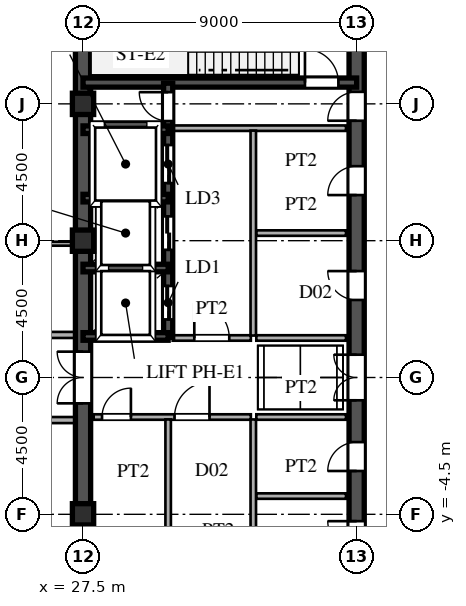
"""IFC4 building model, lengths in metres.
Left out: names, types, materials, properties, quantities, classifications, styles, units other than length and angle.
Written with IfcOpenShell. Run it as: python <this file> out.ifc"""

import sys

from ifc_helpers import new_model, si_unit, direction, frame, frame_2d, origin, origin_2d, place, context, subcontext, project, spatial, rectangle, hollow_rectangle, extrude, source, transform, mapped, element, fill, save


model = new_model("IFC4")
c1 = context("Model", 3, precision=1e-05, world=origin(), true_north=direction((0.0, 1.0)))
c2 = subcontext(c1, "Body", "Model", "MODEL_VIEW")
j1 = project(units=[si_unit("LENGTHUNIT", "METRE"), si_unit("PLANEANGLEUNIT", "RADIAN")], contexts=[c1])
p1 = place(None, origin())
s1 = spatial("IfcSite", under=j1, at=p1, CompositionType="ELEMENT")
p2 = place(p1, origin())
s2 = spatial("IfcBuilding", under=s1, at=p2, CompositionType="ELEMENT")
p3 = place(p2, frame((0.0, 0.0, 269.4)))
s3 = spatial("IfcBuildingStorey", under=s2, at=p3, CompositionType="ELEMENT", Elevation=269.4)
m1 = source(origin(), c2, "Body", "SweptSolid", [
    extrude(hollow_rectangle(XDim=0.7, YDim=0.7, WallThickness=0.03, at=origin_2d()), origin(), (0.0, 0.0, 1.0), 4.8),
])
for number, where, z_axis, x_axis in (
    (1, (27.5, -4.5, 0.0), (0.0, 0.0, 1.0), (1.0, 0.0, 0.0)),
    (2, (27.5, 4.5, 0.0), (0.0, 0.0, 1.0), (1.0, 0.0, 0.0)),
    (3, (27.5, 9.0, 0.0), (0.0, 0.0, 1.0), (1.0, 0.0, 0.0)),
):
    element("IfcColumn", number, at=place(p3, frame(where, z_axis=z_axis, x_axis=x_axis)), inside=s3, PredefinedType="COLUMN", context=c2, shape_type="MappedRepresentation", body=[
        mapped(m1, transform((0.0, 0.0, 0.0), scale=1.0)),
    ])
for number, where, z_axis, x_axis in (
    (4, (27.5, -13.5, 0.0), (0.0, 0.0, 1.0), (0.0, 1.0, 0.0)),
    (5, (27.5, 1.3, 0.0), (0.0, 0.0, 1.0), (0.0, 1.0, 0.0)),
):
    element("IfcWall", number, at=place(p3, frame(where, z_axis=z_axis, x_axis=x_axis)), inside=s3, PredefinedType="SHEAR", context=c2, shape_type="SweptSolid", body=[
        extrude(rectangle(XDim=12.2, YDim=0.5, at=frame_2d((6.1, 0.0))), origin(), (0.0, 0.0, 1.0), 4.54),
    ])
p4 = place(p3, frame((27.5, -1.3, 0.0), z_axis=(0.0, 0.0, 1.0), x_axis=(0.0, 1.0, 0.0)))
e6 = element("IfcWall", 6, at=p4, inside=s3, PredefinedType="SHEAR", context=c2, shape_type="SweptSolid", body=[
    extrude(rectangle(XDim=2.6, YDim=0.5, at=frame_2d((1.3, 0.0))), origin(), (0.0, 0.0, 1.0), 4.54),
])
p5 = place(p4, frame((0.45, 0.0, 0.0)))
e7 = element("IfcOpeningElement", 7, at=p5, cuts=e6, PredefinedType="OPENING", context=c2, shape_type="SweptSolid", body=[
    extrude(rectangle(XDim=1.7, YDim=2.35, at=frame_2d((0.85, 1.175))), frame((0.0, 0.26, 0.0), z_axis=(0.0, -1.0, 0.0), x_axis=(1.0, 0.0, 0.0)), (0.0, 0.0, 1.0), 0.52),
])
p6 = place(p3, frame((36.5, -1.3, 0.0), z_axis=(0.0, 0.0, 1.0), x_axis=(0.0, 1.0, 0.0)))
e8 = element("IfcWall", 8, at=p6, inside=s3, PredefinedType="SHEAR", context=c2, shape_type="SweptSolid", body=[
    extrude(rectangle(XDim=2.6, YDim=0.5, at=frame_2d((1.3, 0.0))), origin(), (0.0, 0.0, 1.0), 4.54),
])
p7 = place(p6, frame((0.55, 0.0, 0.0)))
e9 = element("IfcOpeningElement", 9, at=p7, cuts=e8, PredefinedType="OPENING", context=c2, shape_type="SweptSolid", body=[
    extrude(rectangle(XDim=1.5, YDim=2.3, at=frame_2d((0.75, 1.15))), frame((0.0, 0.26, 0.0), z_axis=(0.0, -1.0, 0.0), x_axis=(1.0, 0.0, 0.0)), (0.0, 0.0, 1.0), 0.52),
])
p8 = place(p3, frame((36.5, 8.2, 0.0), z_axis=(0.0, 0.0, 1.0), x_axis=(0.0, 1.0, 0.0)))
e10 = element("IfcWall", 10, at=p8, inside=s3, PredefinedType="SHEAR", context=c2, shape_type="SweptSolid", body=[
    extrude(rectangle(XDim=5.45, YDim=0.5, at=frame_2d((2.725, 0.0))), origin(), (0.0, 0.0, 1.0), 4.54),
])
p9 = place(p8, frame((0.245, 0.0, 0.0)))
e11 = element("IfcOpeningElement", 11, at=p9, cuts=e10, PredefinedType="OPENING", context=c2, shape_type="SweptSolid", body=[
    extrude(rectangle(XDim=0.95, YDim=2.15, at=frame_2d((0.475, 1.075))), frame((0.0, 0.26, 0.0), z_axis=(0.0, -1.0, 0.0), x_axis=(1.0, 0.0, 0.0)), (0.0, 0.0, 1.0), 0.52),
])
p10 = place(p3, frame((36.5, -6.5, 0.0), z_axis=(0.0, 0.0, 1.0), x_axis=(0.0, 1.0, 0.0)))
e12 = element("IfcWall", 12, at=p10, inside=s3, PredefinedType="SHEAR", context=c2, shape_type="SweptSolid", body=[
    extrude(rectangle(XDim=2.6, YDim=0.5, at=frame_2d((1.3, 0.0))), origin(), (0.0, 0.0, 1.0), 4.54),
])
p11 = place(p10, frame((0.825, 0.0, 0.0)))
e13 = element("IfcOpeningElement", 13, at=p11, cuts=e12, PredefinedType="OPENING", context=c2, shape_type="SweptSolid", body=[
    extrude(rectangle(XDim=0.95, YDim=2.15, at=frame_2d((0.475, 1.075))), frame((0.0, 0.26, 0.0), z_axis=(0.0, -1.0, 0.0), x_axis=(1.0, 0.0, 0.0)), (0.0, 0.0, 1.0), 0.52),
])
p12 = place(p3, frame((36.5, -3.9, 0.0), z_axis=(0.0, 0.0, 1.0), x_axis=(0.0, 1.0, 0.0)))
e14 = element("IfcWall", 14, at=p12, inside=s3, PredefinedType="SHEAR", context=c2, shape_type="SweptSolid", body=[
    extrude(rectangle(XDim=2.6, YDim=0.5, at=frame_2d((1.3, 0.0))), origin(), (0.0, 0.0, 1.0), 4.54),
])
p13 = place(p12, frame((0.825, 0.0, 0.0)))
e15 = element("IfcOpeningElement", 15, at=p13, cuts=e14, PredefinedType="OPENING", context=c2, shape_type="SweptSolid", body=[
    extrude(rectangle(XDim=0.95, YDim=2.15, at=frame_2d((0.475, 1.075))), frame((0.0, 0.26, 0.0), z_axis=(0.0, -1.0, 0.0), x_axis=(1.0, 0.0, 0.0)), (0.0, 0.0, 1.0), 0.52),
])
p14 = place(p3, frame((36.5, 1.3, 0.0), z_axis=(0.0, 0.0, 1.0), x_axis=(0.0, 1.0, 0.0)))
e16 = element("IfcWall", 16, at=p14, inside=s3, PredefinedType="SHEAR", context=c2, shape_type="SweptSolid", body=[
    extrude(rectangle(XDim=3.45, YDim=0.5, at=frame_2d((1.725, 0.0))), origin(), (0.0, 0.0, 1.0), 4.54),
])
p15 = place(p14, frame((1.25, 0.0, 0.0)))
e17 = element("IfcOpeningElement", 17, at=p15, cuts=e16, PredefinedType="OPENING", context=c2, shape_type="SweptSolid", body=[
    extrude(rectangle(XDim=0.95, YDim=2.15, at=frame_2d((0.475, 1.075))), frame((0.0, 0.26, 0.0), z_axis=(0.0, -1.0, 0.0), x_axis=(1.0, 0.0, 0.0)), (0.0, 0.0, 1.0), 0.52),
])
p16 = place(p3, frame((36.5, 4.75, 0.0), z_axis=(0.0, 0.0, 1.0), x_axis=(0.0, 1.0, 0.0)))
e18 = element("IfcWall", 18, at=p16, inside=s3, PredefinedType="SHEAR", context=c2, shape_type="SweptSolid", body=[
    extrude(rectangle(XDim=3.45, YDim=0.5, at=frame_2d((1.725, 0.0))), origin(), (0.0, 0.0, 1.0), 4.54),
])
p17 = place(p16, frame((1.25, 0.0, 0.0)))
e19 = element("IfcOpeningElement", 19, at=p17, cuts=e18, PredefinedType="OPENING", context=c2, shape_type="SweptSolid", body=[
    extrude(rectangle(XDim=0.95, YDim=2.15, at=frame_2d((0.475, 1.075))), frame((0.0, 0.26, 0.0), z_axis=(0.0, -1.0, 0.0), x_axis=(1.0, 0.0, 0.0)), (0.0, 0.0, 1.0), 0.52),
])
p18 = place(p3, frame((27.5, 9.7, 0.0), z_axis=(0.0, 0.0, 1.0), x_axis=(1.0, 0.0, 0.0)))
e20 = element("IfcWall", 20, at=p18, inside=s3, PredefinedType="SHEAR", context=c2, shape_type="SweptSolid", body=[
    extrude(rectangle(XDim=9.0, YDim=0.3, at=frame_2d((4.5, 0.0))), origin(), (0.0, 0.0, 1.0), 4.54),
])
p19 = place(p18, frame((7.3, 0.0, 0.0)))
e21 = element("IfcOpeningElement", 21, at=p19, cuts=e20, PredefinedType="OPENING", context=c2, shape_type="SweptSolid", body=[
    extrude(rectangle(XDim=1.1, YDim=2.2, at=frame_2d((0.55, 1.1))), frame((0.0, 0.16, 0.0), z_axis=(0.0, -1.0, 0.0), x_axis=(1.0, 0.0, 0.0)), (0.0, 0.0, 1.0), 0.32),
])
for number, where, z_axis, x_axis in (
    (22, (27.5, 1.35, 0.0), (0.0, 0.0, 1.0), (1.0, 0.0, 0.0)),
    (23, (27.5, 3.6, 0.0), (0.0, 0.0, 1.0), (1.0, 0.0, 0.0)),
    (24, (27.5, 5.9, 0.0), (0.0, 0.0, 1.0), (1.0, 0.0, 0.0)),
    (25, (27.5, 8.15, 0.0), (0.0, 0.0, 1.0), (1.0, 0.0, 0.0)),
):
    element("IfcWall", number, at=place(p3, frame(where, z_axis=z_axis, x_axis=x_axis)), inside=s3, PredefinedType="SHEAR", context=c2, shape_type="SweptSolid", body=[
        extrude(rectangle(XDim=2.8, YDim=0.25, at=frame_2d((1.4, 0.0))), origin(), (0.0, 0.0, 1.0), 4.54),
    ])
p20 = place(p3, frame((30.3, 1.32, 0.0), z_axis=(0.0, 0.0, 1.0), x_axis=(0.0, 1.0, 0.0)))
e26 = element("IfcWall", 26, at=p20, inside=s3, PredefinedType="SHEAR", context=c2, shape_type="SweptSolid", body=[
    extrude(rectangle(XDim=2.28, YDim=0.3, at=frame_2d((1.14, 0.0))), origin(), (0.0, 0.0, 1.0), 4.54),
])
p21 = place(p20, frame((0.59, 0.0, 0.0)))
e27 = element("IfcOpeningElement", 27, at=p21, cuts=e26, PredefinedType="OPENING", context=c2, shape_type="SweptSolid", body=[
    extrude(rectangle(XDim=1.1, YDim=2.2, at=frame_2d((0.55, 1.1))), frame((0.0, 0.16, 0.0), z_axis=(0.0, -1.0, 0.0), x_axis=(1.0, 0.0, 0.0)), (0.0, 0.0, 1.0), 0.32),
])
p22 = place(p3, frame((30.3, 3.6, 0.0), z_axis=(0.0, 0.0, 1.0), x_axis=(0.0, 1.0, 0.0)))
e28 = element("IfcWall", 28, at=p22, inside=s3, PredefinedType="SHEAR", context=c2, shape_type="SweptSolid", body=[
    extrude(rectangle(XDim=2.3, YDim=0.3, at=frame_2d((1.15, 0.0))), origin(), (0.0, 0.0, 1.0), 4.54),
])
p23 = place(p22, frame((0.6, 0.0, 0.0)))
e29 = element("IfcOpeningElement", 29, at=p23, cuts=e28, PredefinedType="OPENING", context=c2, shape_type="SweptSolid", body=[
    extrude(rectangle(XDim=1.1, YDim=2.2, at=frame_2d((0.55, 1.1))), frame((0.0, 0.16, 0.0), z_axis=(0.0, -1.0, 0.0), x_axis=(1.0, 0.0, 0.0)), (0.0, 0.0, 1.0), 0.32),
])
p24 = place(p3, frame((30.3, 5.9, 0.0), z_axis=(0.0, 0.0, 1.0), x_axis=(0.0, 1.0, 0.0)))
e30 = element("IfcWall", 30, at=p24, inside=s3, PredefinedType="SHEAR", context=c2, shape_type="SweptSolid", body=[
    extrude(rectangle(XDim=2.25, YDim=0.3, at=frame_2d((1.125, 0.0))), origin(), (0.0, 0.0, 1.0), 4.54),
])
p25 = place(p24, frame((0.495, 0.0, 0.0)))
e31 = element("IfcOpeningElement", 31, at=p25, cuts=e30, PredefinedType="OPENING", context=c2, shape_type="SweptSolid", body=[
    extrude(rectangle(XDim=1.25, YDim=2.3, at=frame_2d((0.625, 1.15))), frame((0.0, 0.16, 0.0), z_axis=(0.0, -1.0, 0.0), x_axis=(1.0, 0.0, 0.0)), (0.0, 0.0, 1.0), 0.32),
])
p26 = place(p3, frame((30.3, 8.15, 0.0), z_axis=(0.0, 0.0, 1.0), x_axis=(0.0, 1.0, 0.0)))
e32 = element("IfcWall", 32, at=p26, inside=s3, PredefinedType="SHEAR", context=c2, shape_type="SweptSolid", body=[
    extrude(rectangle(XDim=1.53, YDim=0.3, at=frame_2d((0.765, 0.0))), origin(), (0.0, 0.0, 1.0), 4.54),
])
p27 = place(p26, frame((0.285, 0.0, 0.0)))
e33 = element("IfcOpeningElement", 33, at=p27, cuts=e32, PredefinedType="OPENING", context=c2, shape_type="SweptSolid", body=[
    extrude(rectangle(XDim=0.95, YDim=2.15, at=frame_2d((0.475, 1.075))), frame((0.0, 0.16, 0.0), z_axis=(0.0, -1.0, 0.0), x_axis=(1.0, 0.0, 0.0)), (0.0, 0.0, 1.0), 0.32),
])
p28 = place(p3, frame((30.45, 8.2, 0.0), z_axis=(0.0, 0.0, 1.0), x_axis=(1.0, 0.0, 0.0)))
e34 = element("IfcWall", 34, at=p28, inside=s3, PredefinedType="PARTITIONING", context=c2, shape_type="SweptSolid", body=[
    extrude(rectangle(XDim=5.7, YDim=0.18, at=frame_2d((2.85, 0.0))), origin(), (0.0, 0.0, 1.0), 4.54),
])
p29 = place(p3, frame((33.1, -6.42, 0.0), z_axis=(0.0, 0.0, 1.0), x_axis=(0.0, 1.0, 0.0)))
e35 = element("IfcWall", 35, at=p29, inside=s3, PredefinedType="PARTITIONING", context=c2, shape_type="SweptSolid", body=[
    extrude(rectangle(XDim=5.04, YDim=0.18, at=frame_2d((2.52, 0.0))), origin(), (0.0, 0.0, 1.0), 4.54),
])
p30 = place(p3, frame((33.1, 1.38, 0.0), z_axis=(0.0, 0.0, 1.0), x_axis=(0.0, 1.0, 0.0)))
e36 = element("IfcWall", 36, at=p30, inside=s3, PredefinedType="PARTITIONING", context=c2, shape_type="SweptSolid", body=[
    extrude(rectangle(XDim=6.74, YDim=0.18, at=frame_2d((3.37, 0.0))), origin(), (0.0, 0.0, 1.0), 4.54),
])
p31 = place(p3, frame((27.85, -1.3, 0.0), z_axis=(0.0, 0.0, 1.0), x_axis=(1.0, 0.0, 0.0)))
e37 = element("IfcWall", 37, at=p31, inside=s3, PredefinedType="PARTITIONING", context=c2, shape_type="SweptSolid", body=[
    extrude(rectangle(XDim=2.45, YDim=0.18, at=frame_2d((1.225, 0.0))), origin(), (0.0, 0.0, 1.0), 4.54),
])
p32 = place(p31, frame((0.275, 0.0, 0.0)))
e38 = element("IfcOpeningElement", 38, at=p32, cuts=e37, PredefinedType="OPENING", context=c2, shape_type="SweptSolid", body=[
    extrude(rectangle(XDim=0.95, YDim=2.15, at=frame_2d((0.475, 1.075))), frame((0.0, 0.1, 0.0), z_axis=(0.0, -1.0, 0.0), x_axis=(1.0, 0.0, 0.0)), (0.0, 0.0, 1.0), 0.2),
])
p33 = place(p3, frame((30.3, -1.3, 0.0), z_axis=(0.0, 0.0, 1.0), x_axis=(1.0, 0.0, 0.0)))
e39 = element("IfcWall", 39, at=p33, inside=s3, PredefinedType="PARTITIONING", context=c2, shape_type="SweptSolid", body=[
    extrude(rectangle(XDim=2.72, YDim=0.18, at=frame_2d((1.36, 0.0))), origin(), (0.0, 0.0, 1.0), 4.54),
])
p34 = place(p33, frame((0.21, 0.0, 0.0)))
e40 = element("IfcOpeningElement", 40, at=p34, cuts=e39, PredefinedType="OPENING", context=c2, shape_type="SweptSolid", body=[
    extrude(rectangle(XDim=1.15, YDim=2.2, at=frame_2d((0.575, 1.1))), frame((0.0, 0.1, 0.0), z_axis=(0.0, -1.0, 0.0), x_axis=(1.0, 0.0, 0.0)), (0.0, 0.0, 1.0), 0.2),
])
p35 = place(p3, frame((30.3, -7.12, 0.0), z_axis=(0.0, 0.0, 1.0), x_axis=(0.0, 1.0, 0.0)))
e41 = element("IfcWall", 41, at=p35, inside=s3, PredefinedType="PARTITIONING", context=c2, shape_type="SweptSolid", body=[
    extrude(rectangle(XDim=5.74, YDim=0.18, at=frame_2d((2.87, 0.0))), origin(), (0.0, 0.0, 1.0), 4.54),
])
p36 = place(p3, frame((30.45, 1.3, 0.0), z_axis=(0.0, 0.0, 1.0), x_axis=(1.0, 0.0, 0.0)))
e42 = element("IfcWall", 42, at=p36, inside=s3, PredefinedType="PARTITIONING", context=c2, shape_type="SweptSolid", body=[
    extrude(rectangle(XDim=2.57, YDim=0.18, at=frame_2d((1.285, 0.0))), origin(), (0.0, 0.0, 1.0), 4.54),
])
p37 = place(p36, frame((0.71, 0.0, 0.0)))
e43 = element("IfcOpeningElement", 43, at=p37, cuts=e42, PredefinedType="OPENING", context=c2, shape_type="SweptSolid", body=[
    extrude(rectangle(XDim=1.15, YDim=2.2, at=frame_2d((0.575, 1.1))), frame((0.0, 0.1, 0.0), z_axis=(0.0, -1.0, 0.0), x_axis=(1.0, 0.0, 0.0)), (0.0, 0.0, 1.0), 0.2),
])
for number, where, z_axis, x_axis in (
    (44, (33.2, -1.3, 0.0), (0.0, 0.0, 1.0), (1.0, 0.0, 0.0)),
    (45, (33.2, 1.3, 0.0), (0.0, 0.0, 1.0), (1.0, 0.0, 0.0)),
    (46, (33.2, -3.9, 0.0), (0.0, 0.0, 1.0), (1.0, 0.0, 0.0)),
    (47, (33.2, 4.75, 0.0), (0.0, 0.0, 1.0), (1.0, 0.0, 0.0)),
):
    element("IfcWall", number, at=place(p3, frame(where, z_axis=z_axis, x_axis=x_axis)), inside=s3, PredefinedType="PARTITIONING", context=c2, shape_type="SweptSolid", body=[
        extrude(rectangle(XDim=2.95, YDim=0.18, at=frame_2d((1.475, 0.0))), origin(), (0.0, 0.0, 1.0), 4.54),
    ])
p38 = place(p3, frame((-27.245, -1.4, 0.0), z_axis=(0.0, 0.0, 1.0), x_axis=(1.0, 0.0, 0.0)))
e48 = element("IfcWall", 48, at=p38, inside=s3, PredefinedType="PARTITIONING", context=c2, shape_type="SweptSolid", body=[
    extrude(rectangle(XDim=54.49, YDim=0.2, at=frame_2d((27.245, 0.0))), origin(), (0.0, 0.0, 1.0), 4.54),
])
p39 = place(p38, frame((17.67, 0.0, 0.0)))
e49 = element("IfcOpeningElement", 49, at=p39, cuts=e48, PredefinedType="OPENING", context=c2, shape_type="SweptSolid", body=[
    extrude(rectangle(XDim=1.15, YDim=2.2, at=frame_2d((0.575, 1.1))), frame((0.0, 0.11, 0.0), z_axis=(0.0, -1.0, 0.0), x_axis=(1.0, 0.0, 0.0)), (0.0, 0.0, 1.0), 0.22),
])
p40 = place(p38, frame((35.17, 0.0, 0.0)))
e50 = element("IfcOpeningElement", 50, at=p40, cuts=e48, PredefinedType="OPENING", context=c2, shape_type="SweptSolid", body=[
    extrude(rectangle(XDim=1.15, YDim=2.2, at=frame_2d((0.575, 1.1))), frame((0.0, 0.11, 0.0), z_axis=(0.0, -1.0, 0.0), x_axis=(1.0, 0.0, 0.0)), (0.0, 0.0, 1.0), 0.22),
])
p41 = place(p3, frame((-27.245, 1.4, 0.0), z_axis=(0.0, 0.0, 1.0), x_axis=(1.0, 0.0, 0.0)))
e51 = element("IfcWall", 51, at=p41, inside=s3, PredefinedType="PARTITIONING", context=c2, shape_type="SweptSolid", body=[
    extrude(rectangle(XDim=54.49, YDim=0.2, at=frame_2d((27.245, 0.0))), origin(), (0.0, 0.0, 1.0), 4.54),
])
p42 = place(p41, frame((17.67, 0.0, 0.0)))
e52 = element("IfcOpeningElement", 52, at=p42, cuts=e51, PredefinedType="OPENING", context=c2, shape_type="SweptSolid", body=[
    extrude(rectangle(XDim=1.15, YDim=2.2, at=frame_2d((0.575, 1.1))), frame((0.0, 0.11, 0.0), z_axis=(0.0, -1.0, 0.0), x_axis=(1.0, 0.0, 0.0)), (0.0, 0.0, 1.0), 0.22),
])
p43 = place(p41, frame((46.055, 0.0, 0.0)))
e53 = element("IfcOpeningElement", 53, at=p43, cuts=e51, PredefinedType="OPENING", context=c2, shape_type="SweptSolid", body=[
    extrude(rectangle(XDim=0.88, YDim=2.1, at=frame_2d((0.44, 1.05))), frame((0.0, 0.11, 0.0), z_axis=(0.0, -1.0, 0.0), x_axis=(1.0, 0.0, 0.0)), (0.0, 0.0, 1.0), 0.22),
])
p44 = place(p41, frame((51.405, 0.0, 0.0)))
e54 = element("IfcOpeningElement", 54, at=p44, cuts=e51, PredefinedType="OPENING", context=c2, shape_type="SweptSolid", body=[
    extrude(rectangle(XDim=0.88, YDim=2.1, at=frame_2d((0.44, 1.05))), frame((0.0, 0.11, 0.0), z_axis=(0.0, -1.0, 0.0), x_axis=(1.0, 0.0, 0.0)), (0.0, 0.0, 1.0), 0.22),
])
p45 = place(p3, frame((16.585, 4.4, 0.0), z_axis=(0.0, 0.0, 1.0), x_axis=(1.0, 0.0, 0.0)))
e55 = element("IfcWall", 55, at=p45, inside=s3, PredefinedType="PARTITIONING", context=c2, shape_type="SweptSolid", body=[
    extrude(rectangle(XDim=10.66, YDim=0.13, at=frame_2d((5.33, 0.0))), origin(), (0.0, 0.0, 1.0), 4.54),
])
m2 = source(origin(), c2, "Body", "SweptSolid", [
    extrude(rectangle(XDim=1.7, YDim=2.35, at=frame_2d((0.85, 1.175))), frame((0.0, 0.025, 0.0), z_axis=(0.0, -1.0, 0.0), x_axis=(1.0, 0.0, 0.0)), (0.0, 0.0, 1.0), 0.05),
])
p46 = place(p5, origin())
e56 = element("IfcDoor", 56, at=p46, inside=s3, OperationType="DOUBLE_SWING_LEFT", PredefinedType="DOOR", context=c2, shape_type="MappedRepresentation", body=[
    mapped(m2, transform((0.0, 0.0, 0.0), scale=1.0)),
])
fill(e7, e56)
m3 = source(origin(), c2, "Body", "SweptSolid", [
    extrude(rectangle(XDim=1.5, YDim=2.3, at=frame_2d((0.75, 1.15))), frame((0.0, 0.025, 0.0), z_axis=(0.0, -1.0, 0.0), x_axis=(1.0, 0.0, 0.0)), (0.0, 0.0, 1.0), 0.05),
])
p47 = place(p7, origin())
e57 = element("IfcDoor", 57, at=p47, inside=s3, OperationType="DOUBLE_SWING_LEFT", PredefinedType="DOOR", context=c2, shape_type="MappedRepresentation", body=[
    mapped(m3, transform((0.0, 0.0, 0.0), scale=1.0)),
])
fill(e9, e57)
m4 = source(origin(), c2, "Body", "SweptSolid", [
    extrude(rectangle(XDim=0.95, YDim=2.15, at=frame_2d((0.475, 1.075))), frame((0.0, 0.025, 0.0), z_axis=(0.0, -1.0, 0.0), x_axis=(1.0, 0.0, 0.0)), (0.0, 0.0, 1.0), 0.05),
])
p48 = place(p9, origin())
e58 = element("IfcDoor", 58, at=p48, inside=s3, OperationType="SINGLE_SWING_LEFT", PredefinedType="DOOR", context=c2, shape_type="MappedRepresentation", body=[
    mapped(m4, transform((0.0, 0.0, 0.0), scale=1.0)),
])
fill(e11, e58)
p49 = place(p11, origin())
e59 = element("IfcDoor", 59, at=p49, inside=s3, OperationType="SINGLE_SWING_RIGHT", PredefinedType="DOOR", context=c2, shape_type="MappedRepresentation", body=[
    mapped(m4, transform((0.0, 0.0, 0.0), scale=1.0)),
])
fill(e13, e59)
p50 = place(p13, origin())
e60 = element("IfcDoor", 60, at=p50, inside=s3, OperationType="SINGLE_SWING_LEFT", PredefinedType="DOOR", context=c2, shape_type="MappedRepresentation", body=[
    mapped(m4, transform((0.0, 0.0, 0.0), scale=1.0)),
])
fill(e15, e60)
p51 = place(p15, origin())
e61 = element("IfcDoor", 61, at=p51, inside=s3, OperationType="SINGLE_SWING_RIGHT", PredefinedType="DOOR", context=c2, shape_type="MappedRepresentation", body=[
    mapped(m4, transform((0.0, 0.0, 0.0), scale=1.0)),
])
fill(e17, e61)
p52 = place(p17, origin())
e62 = element("IfcDoor", 62, at=p52, inside=s3, OperationType="SINGLE_SWING_LEFT", PredefinedType="DOOR", context=c2, shape_type="MappedRepresentation", body=[
    mapped(m4, transform((0.0, 0.0, 0.0), scale=1.0)),
])
fill(e19, e62)
m5 = source(origin(), c2, "Body", "SweptSolid", [
    extrude(rectangle(XDim=1.1, YDim=2.2, at=frame_2d((0.55, 1.1))), frame((0.0, 0.025, 0.0), z_axis=(0.0, -1.0, 0.0), x_axis=(1.0, 0.0, 0.0)), (0.0, 0.0, 1.0), 0.05),
])
p53 = place(p19, origin())
e63 = element("IfcDoor", 63, at=p53, inside=s3, OperationType="SINGLE_SWING_LEFT", PredefinedType="DOOR", context=c2, shape_type="MappedRepresentation", body=[
    mapped(m5, transform((0.0, 0.0, 0.0), scale=1.0)),
])
fill(e21, e63)
m6 = source(origin(), c2, "Body", "SweptSolid", [
    extrude(rectangle(XDim=1.1, YDim=2.2, at=frame_2d((0.55, 1.1))), frame((0.0, 0.025, 0.0), z_axis=(0.0, -1.0, 0.0), x_axis=(1.0, 0.0, 0.0)), (0.0, 0.0, 1.0), 0.05),
])
p54 = place(p21, origin())
e64 = element("IfcDoor", 64, at=p54, inside=s3, OperationType="DOUBLE_DOOR_SLIDING", PredefinedType="DOOR", context=c2, shape_type="MappedRepresentation", body=[
    mapped(m6, transform((0.0, 0.0, 0.0), scale=1.0)),
])
fill(e27, e64)
p55 = place(p23, origin())
e65 = element("IfcDoor", 65, at=p55, inside=s3, OperationType="DOUBLE_DOOR_SLIDING", PredefinedType="DOOR", context=c2, shape_type="MappedRepresentation", body=[
    mapped(m6, transform((0.0, 0.0, 0.0), scale=1.0)),
])
fill(e29, e65)
m7 = source(origin(), c2, "Body", "SweptSolid", [
    extrude(rectangle(XDim=1.25, YDim=2.3, at=frame_2d((0.625, 1.15))), frame((0.0, 0.025, 0.0), z_axis=(0.0, -1.0, 0.0), x_axis=(1.0, 0.0, 0.0)), (0.0, 0.0, 1.0), 0.05),
])
p56 = place(p25, origin())
e66 = element("IfcDoor", 66, at=p56, inside=s3, OperationType="DOUBLE_DOOR_SLIDING", PredefinedType="DOOR", context=c2, shape_type="MappedRepresentation", body=[
    mapped(m7, transform((0.0, 0.0, 0.0), scale=1.0)),
])
fill(e31, e66)
p57 = place(p27, origin())
e67 = element("IfcDoor", 67, at=p57, inside=s3, OperationType="SINGLE_SWING_RIGHT", PredefinedType="DOOR", context=c2, shape_type="MappedRepresentation", body=[
    mapped(m4, transform((0.0, 0.0, 0.0), scale=1.0)),
])
fill(e33, e67)
p58 = place(p32, origin())
e68 = element("IfcDoor", 68, at=p58, inside=s3, OperationType="SINGLE_SWING_RIGHT", PredefinedType="DOOR", context=c2, shape_type="MappedRepresentation", body=[
    mapped(m4, transform((0.0, 0.0, 0.0), scale=1.0)),
])
fill(e38, e68)
m8 = source(origin(), c2, "Body", "SweptSolid", [
    extrude(rectangle(XDim=1.15, YDim=2.2, at=frame_2d((0.575, 1.1))), frame((0.0, 0.025, 0.0), z_axis=(0.0, -1.0, 0.0), x_axis=(1.0, 0.0, 0.0)), (0.0, 0.0, 1.0), 0.05),
])
p59 = place(p34, origin())
e69 = element("IfcDoor", 69, at=p59, inside=s3, OperationType="SINGLE_SWING_RIGHT", PredefinedType="DOOR", context=c2, shape_type="MappedRepresentation", body=[
    mapped(m8, transform((0.0, 0.0, 0.0), scale=1.0)),
])
fill(e40, e69)
p60 = place(p37, origin())
e70 = element("IfcDoor", 70, at=p60, inside=s3, OperationType="SINGLE_SWING_LEFT", PredefinedType="DOOR", context=c2, shape_type="MappedRepresentation", body=[
    mapped(m8, transform((0.0, 0.0, 0.0), scale=1.0)),
])
fill(e43, e70)
save(model, sys.argv[1])
